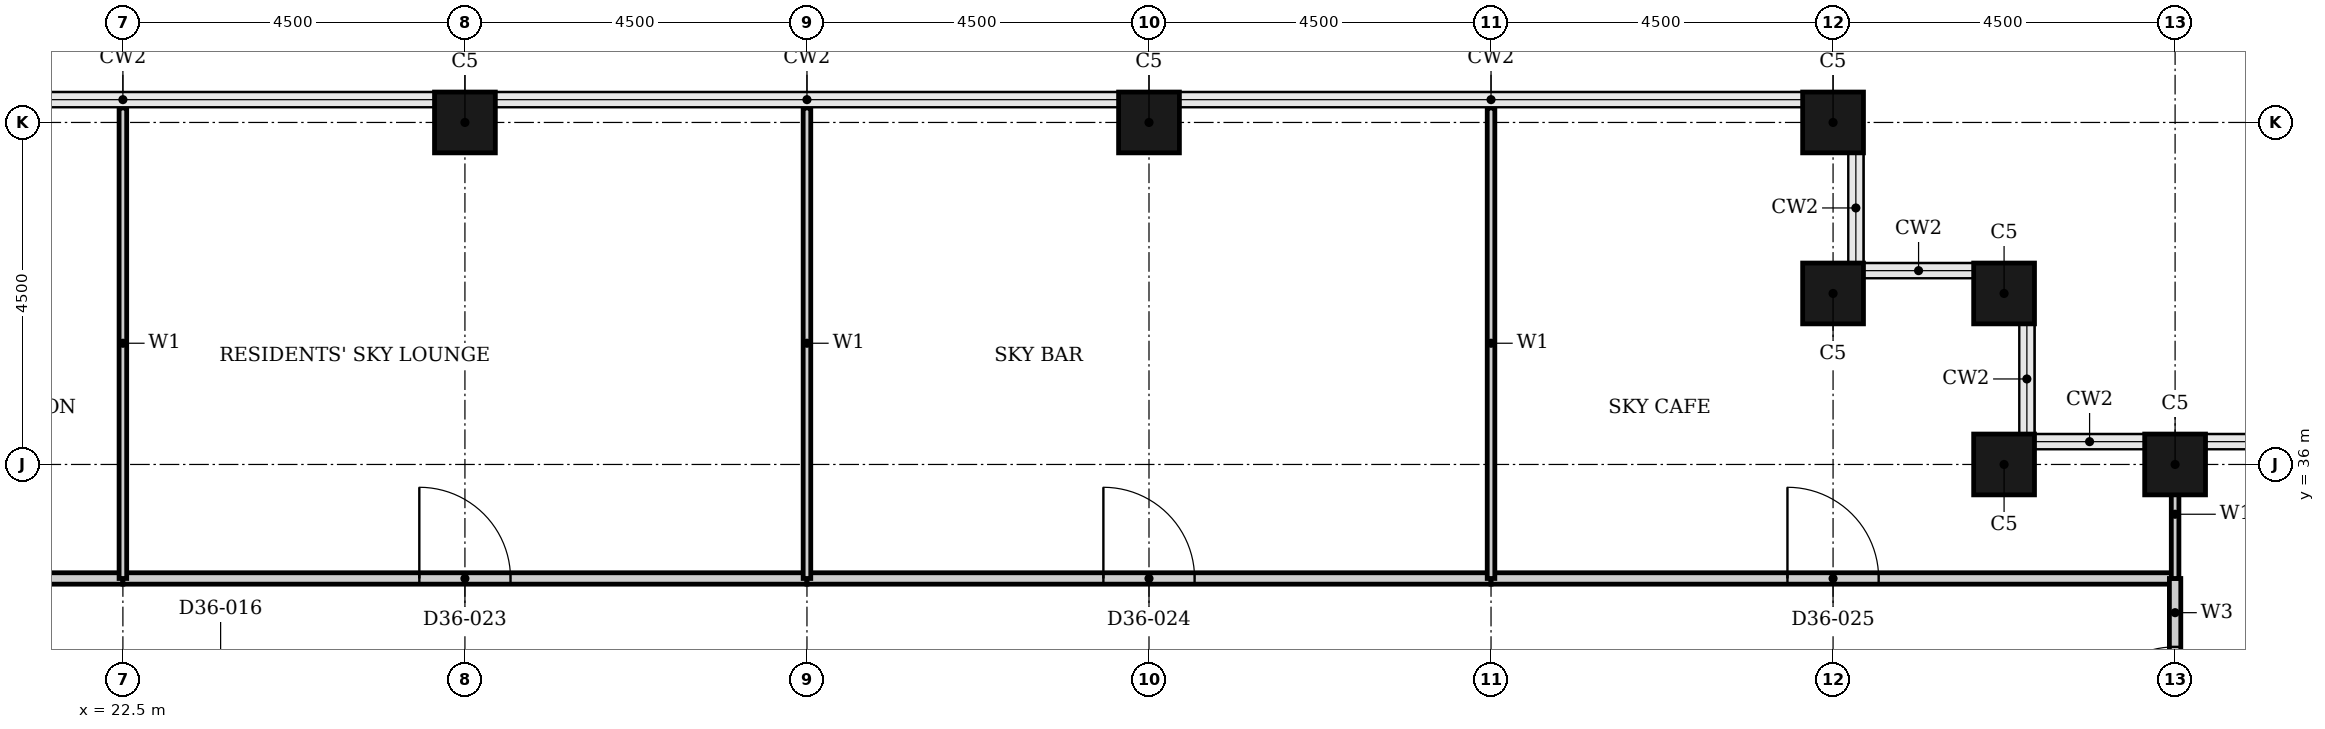
"""IFC4 building model, lengths in metres.
Left out: names, types, materials, properties, quantities, classifications, styles, units other than length and angle.
Written with IfcOpenShell. Run it as: python <this file> out.ifc"""

import sys

from ifc_helpers import new_model, si_unit, direction, frame, frame_2d, origin, origin_2d, place, context, subcontext, project, spatial, rectangle, hollow_rectangle, extrude, element, fill, save


model = new_model("IFC4")
c1 = context("Model", 3, precision=1e-05, world=origin(), true_north=direction((0.0, 1.0)))
c2 = subcontext(c1, "Body", "Model", "MODEL_VIEW")
j1 = project(units=[si_unit("LENGTHUNIT", "METRE"), si_unit("PLANEANGLEUNIT", "RADIAN")], contexts=[c1])
p1 = place(None, origin())
s1 = spatial("IfcSite", under=j1, at=p1, CompositionType="ELEMENT")
p2 = place(p1, origin())
s2 = spatial("IfcBuilding", under=s1, at=p2, CompositionType="ELEMENT")
p3 = place(p2, frame((0.0, 0.0, 145.2)))
s3 = spatial("IfcBuildingStorey", under=s2, at=p3, CompositionType="ELEMENT", Elevation=145.2)
for number, where, z_axis, x_axis in (
    (1, (49.5, 36.0, 0.0), (0.0, 0.0, 1.0), (1.0, 0.0, 0.0)),
    (2, (47.25, 36.0, 0.0), (0.0, 0.0, 1.0), (1.0, 0.0, 0.0)),
    (3, (47.25, 38.25, 0.0), (0.0, 0.0, 1.0), (1.0, 0.0, 0.0)),
    (4, (45.0, 38.25, 0.0), (0.0, 0.0, 1.0), (1.0, 0.0, 0.0)),
    (5, (45.0, 40.5, 0.0), (0.0, 0.0, 1.0), (1.0, 0.0, 0.0)),
    (6, (36.0, 40.5, 0.0), (0.0, 0.0, 1.0), (1.0, 0.0, 0.0)),
    (7, (27.0, 40.5, 0.0), (0.0, 0.0, 1.0), (1.0, 0.0, 0.0)),
):
    element("IfcColumn", number, at=place(p3, frame(where, z_axis=z_axis, x_axis=x_axis)), inside=s3, PredefinedType="COLUMN", context=c2, shape_type="SweptSolid", body=[
        extrude(hollow_rectangle(XDim=0.8, YDim=0.8, WallThickness=0.025, at=origin_2d()), origin(), (0.0, 0.0, 1.0), 5.4),
    ])
p4 = place(p3, frame((13.5, 34.5, 0.0), z_axis=(0.0, 0.0, 1.0), x_axis=(1.0, 0.0, 0.0)))
e8 = element("IfcWall", 8, at=p4, inside=s3, PredefinedType="PARTITIONING", context=c2, shape_type="SweptSolid", body=[
    extrude(rectangle(XDim=9.0, YDim=0.15, at=frame_2d((4.5, 0.0))), origin(), (0.0, 0.0, 1.0), 5.1),
])
p5 = place(p4, frame((3.9, 0.0, 0.0)))
e9 = element("IfcOpeningElement", 9, at=p5, cuts=e8, PredefinedType="OPENING", context=c2, shape_type="SweptSolid", body=[
    extrude(rectangle(XDim=1.2, YDim=2.4, at=frame_2d((0.6, 1.2))), frame((0.0, 0.085, 0.0), z_axis=(0.0, -1.0, 0.0), x_axis=(1.0, 0.0, 0.0)), (0.0, 0.0, 1.0), 0.17),
])
p6 = place(p3, frame((22.5, 34.5, 0.0), z_axis=(0.0, 0.0, 1.0), x_axis=(1.0, 0.0, 0.0)))
e10 = element("IfcWall", 10, at=p6, inside=s3, PredefinedType="PARTITIONING", context=c2, shape_type="SweptSolid", body=[
    extrude(rectangle(XDim=9.0, YDim=0.15, at=frame_2d((4.5, 0.0))), origin(), (0.0, 0.0, 1.0), 5.1),
])
p7 = place(p6, frame((3.9, 0.0, 0.0)))
e11 = element("IfcOpeningElement", 11, at=p7, cuts=e10, PredefinedType="OPENING", context=c2, shape_type="SweptSolid", body=[
    extrude(rectangle(XDim=1.2, YDim=2.4, at=frame_2d((0.6, 1.2))), frame((0.0, 0.085, 0.0), z_axis=(0.0, -1.0, 0.0), x_axis=(1.0, 0.0, 0.0)), (0.0, 0.0, 1.0), 0.17),
])
p8 = place(p3, frame((31.5, 34.5, 0.0), z_axis=(0.0, 0.0, 1.0), x_axis=(1.0, 0.0, 0.0)))
e12 = element("IfcWall", 12, at=p8, inside=s3, PredefinedType="PARTITIONING", context=c2, shape_type="SweptSolid", body=[
    extrude(rectangle(XDim=9.0, YDim=0.15, at=frame_2d((4.5, 0.0))), origin(), (0.0, 0.0, 1.0), 5.1),
])
p9 = place(p8, frame((3.9, 0.0, 0.0)))
e13 = element("IfcOpeningElement", 13, at=p9, cuts=e12, PredefinedType="OPENING", context=c2, shape_type="SweptSolid", body=[
    extrude(rectangle(XDim=1.2, YDim=2.4, at=frame_2d((0.6, 1.2))), frame((0.0, 0.085, 0.0), z_axis=(0.0, -1.0, 0.0), x_axis=(1.0, 0.0, 0.0)), (0.0, 0.0, 1.0), 0.17),
])
p10 = place(p3, frame((40.5, 34.5, 0.0), z_axis=(0.0, 0.0, 1.0), x_axis=(1.0, 0.0, 0.0)))
e14 = element("IfcWall", 14, at=p10, inside=s3, PredefinedType="PARTITIONING", context=c2, shape_type="SweptSolid", body=[
    extrude(rectangle(XDim=9.0, YDim=0.15, at=frame_2d((4.5, 0.0))), origin(), (0.0, 0.0, 1.0), 5.1),
])
p11 = place(p10, frame((3.9, 0.0, 0.0)))
e15 = element("IfcOpeningElement", 15, at=p11, cuts=e14, PredefinedType="OPENING", context=c2, shape_type="SweptSolid", body=[
    extrude(rectangle(XDim=1.2, YDim=2.4, at=frame_2d((0.6, 1.2))), frame((0.0, 0.085, 0.0), z_axis=(0.0, -1.0, 0.0), x_axis=(1.0, 0.0, 0.0)), (0.0, 0.0, 1.0), 0.17),
])
p12 = place(p3, frame((49.5, 31.5, 0.0), z_axis=(0.0, 0.0, 1.0), x_axis=(0.0, 1.0, 0.0)))
e16 = element("IfcWall", 16, at=p12, inside=s3, PredefinedType="PARTITIONING", context=c2, shape_type="SweptSolid", body=[
    extrude(rectangle(XDim=3.0, YDim=0.15, at=frame_2d((1.5, 0.0))), origin(), (0.0, 0.0, 1.0), 4.18),
])
p13 = place(p12, frame((0.9, 0.0, 0.0)))
e17 = element("IfcOpeningElement", 17, at=p13, cuts=e16, PredefinedType="OPENING", context=c2, shape_type="SweptSolid", body=[
    extrude(rectangle(XDim=1.2, YDim=2.4, at=frame_2d((0.6, 1.2))), frame((0.0, 0.085, 0.0), z_axis=(0.0, -1.0, 0.0), x_axis=(1.0, 0.0, 0.0)), (0.0, 0.0, 1.0), 0.17),
])
for number, where, z_axis, x_axis in (
    (18, (22.5, 34.5, 0.0), (0.0, 0.0, 1.0), (0.0, 1.0, 0.0)),
    (19, (31.5, 34.5, 0.0), (0.0, 0.0, 1.0), (0.0, 1.0, 0.0)),
    (20, (40.5, 34.5, 0.0), (0.0, 0.0, 1.0), (0.0, 1.0, 0.0)),
):
    element("IfcWall", number, at=place(p3, frame(where, z_axis=z_axis, x_axis=x_axis)), inside=s3, PredefinedType="PARTITIONING", context=c2, shape_type="SweptSolid", body=[
        extrude(rectangle(XDim=6.19, YDim=0.1, at=frame_2d((3.095, 0.0))), origin(), (0.0, 0.0, 1.0), 5.1),
    ])
p14 = place(p3, frame((49.5, 34.5, 0.0), z_axis=(0.0, 0.0, 1.0), x_axis=(0.0, 1.0, 0.0)))
e21 = element("IfcWall", 21, at=p14, inside=s3, PredefinedType="PARTITIONING", context=c2, shape_type="SweptSolid", body=[
    extrude(rectangle(XDim=1.69, YDim=0.1, at=frame_2d((0.845, 0.0))), origin(), (0.0, 0.0, 1.0), 4.18),
])
p15 = place(p7, origin())
e22 = element("IfcDoor", 22, at=p15, inside=s3, OperationType="SINGLE_SWING_RIGHT", PredefinedType="DOOR", context=c2, shape_type="SweptSolid", body=[
    extrude(rectangle(XDim=1.2, YDim=2.4, at=frame_2d((0.6, 1.2))), frame((0.0, 0.025, 0.0), z_axis=(0.0, -1.0, 0.0), x_axis=(1.0, 0.0, 0.0)), (0.0, 0.0, 1.0), 0.05),
])
fill(e11, e22)
p16 = place(p9, origin())
e23 = element("IfcDoor", 23, at=p16, inside=s3, OperationType="SINGLE_SWING_RIGHT", PredefinedType="DOOR", context=c2, shape_type="SweptSolid", body=[
    extrude(rectangle(XDim=1.2, YDim=2.4, at=frame_2d((0.6, 1.2))), frame((0.0, 0.025, 0.0), z_axis=(0.0, -1.0, 0.0), x_axis=(1.0, 0.0, 0.0)), (0.0, 0.0, 1.0), 0.05),
])
fill(e13, e23)
p17 = place(p11, origin())
e24 = element("IfcDoor", 24, at=p17, inside=s3, OperationType="SINGLE_SWING_RIGHT", PredefinedType="DOOR", context=c2, shape_type="SweptSolid", body=[
    extrude(rectangle(XDim=1.2, YDim=2.4, at=frame_2d((0.6, 1.2))), frame((0.0, 0.025, 0.0), z_axis=(0.0, -1.0, 0.0), x_axis=(1.0, 0.0, 0.0)), (0.0, 0.0, 1.0), 0.05),
])
fill(e15, e24)
p18 = place(p13, origin())
e25 = element("IfcDoor", 25, at=p18, inside=s3, OperationType="SINGLE_SWING_RIGHT", PredefinedType="DOOR", context=c2, shape_type="SweptSolid", body=[
    extrude(rectangle(XDim=1.2, YDim=2.4, at=frame_2d((0.6, 1.2))), frame((0.0, 0.025, 0.0), z_axis=(0.0, -1.0, 0.0), x_axis=(1.0, 0.0, 0.0)), (0.0, 0.0, 1.0), 0.05),
])
fill(e17, e25)
save(model, sys.argv[1])
